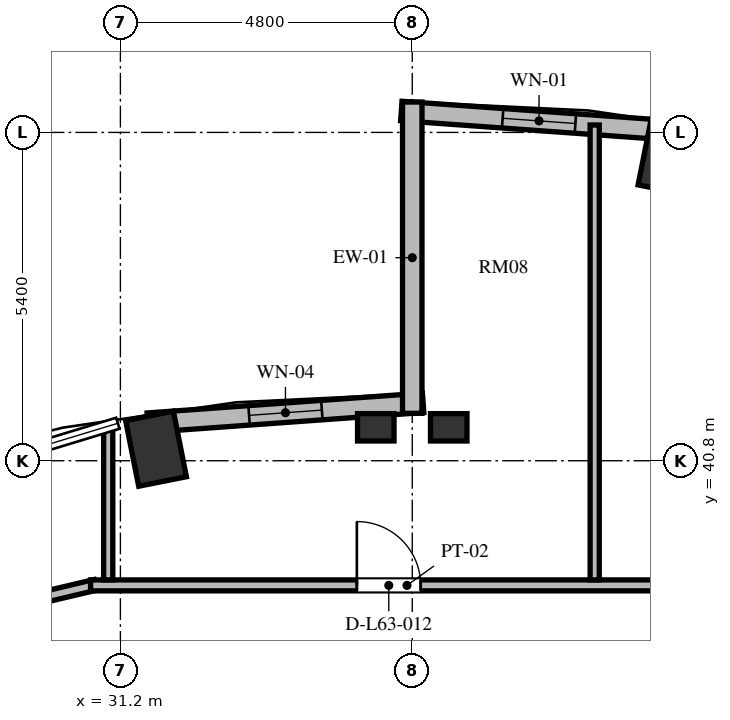
"""IFC4 building model, lengths in metres.
Left out: names, types, materials, properties, quantities, classifications, styles, units other than length and angle.
Written with IfcOpenShell. Run it as: python <this file> out.ifc"""

import sys

from ifc_helpers import new_model, si_unit, direction, frame, frame_2d, origin, origin_2d, place, context, subcontext, project, spatial, rectangle, extrude, element, fill, save


model = new_model("IFC4")
c1 = context("Model", 3, precision=1e-05, world=origin(), true_north=direction((0.0, 1.0)))
c2 = subcontext(c1, "Body", "Model", "MODEL_VIEW")
j1 = project(units=[si_unit("LENGTHUNIT", "METRE"), si_unit("PLANEANGLEUNIT", "RADIAN")], contexts=[c1])
p1 = place(None, origin())
s1 = spatial("IfcSite", under=j1, at=p1, CompositionType="ELEMENT")
p2 = place(p1, origin())
s2 = spatial("IfcBuilding", under=s1, at=p2, CompositionType="ELEMENT")
p3 = place(p2, frame((0.0, 0.0, 242.256)))
s3 = spatial("IfcBuildingStorey", under=s2, at=p3, CompositionType="ELEMENT", Elevation=242.256)
for number, where, z_axis, x_axis in (
    (1, (40.214, 45.798, 0.0), (0.0, 0.0, 1.0), (0.195, 0.981, 0.0)),
    (2, (31.786, 40.998, 0.0), (0.0, 0.0, 1.0), (-0.195, 0.981, 0.0)),
):
    element("IfcColumn", number, at=place(p3, frame(where, z_axis=z_axis, x_axis=x_axis)), inside=s3, PredefinedType="COLUMN", context=c2, shape_type="SweptSolid", body=[
        extrude(rectangle(XDim=1.1, YDim=0.8, at=origin_2d()), origin(), (0.0, 0.0, 1.0), 3.648),
    ])
for number, where, z_axis, x_axis in (
    (3, (35.4, 41.35, 0.0), (0.0, 0.0, 1.0), (1.0, 0.0, 0.0)),
    (4, (36.6, 41.35, 0.0), (0.0, 0.0, 1.0), (1.0, 0.0, 0.0)),
):
    element("IfcColumn", number, at=place(p3, frame(where, z_axis=z_axis, x_axis=x_axis)), inside=s3, PredefinedType="PILASTER", context=c2, shape_type="SweptSolid", body=[
        extrude(rectangle(XDim=0.6, YDim=0.45, at=origin_2d()), origin(), (0.0, 0.0, 1.0), 3.648),
    ])
p4 = place(p3, frame((40.35, 46.226, 0.0), z_axis=(0.0, 0.0, 1.0), x_axis=(-0.997409061056, 0.071938619141, 0.0)))
e5 = element("IfcWall", 5, at=p4, inside=s3, PredefinedType="SOLIDWALL", context=c2, shape_type="SweptSolid", body=[
    extrude(rectangle(XDim=4.541, YDim=0.32, at=frame_2d((2.271, 0.0))), origin(), (0.0, 0.0, 1.0), 3.198),
])
p5 = place(p4, frame((1.67, 0.0, 0.85)))
e6 = element("IfcOpeningElement", 6, at=p5, cuts=e5, PredefinedType="OPENING", context=c2, shape_type="SweptSolid", body=[
    extrude(rectangle(XDim=1.2, YDim=2.2, at=frame_2d((0.6, 1.1))), frame((0.0, 0.17, 0.0), z_axis=(0.0, -1.0, 0.0), x_axis=(1.0, 0.0, 0.0)), (0.0, 0.0, 1.0), 0.34),
])
p6 = place(p3, frame((36.179, 41.753, 0.0), z_axis=(0.0, 0.0, 1.0), x_axis=(-0.997408782787, -0.071942477163, 0.0)))
e7 = element("IfcWall", 7, at=p6, inside=s3, PredefinedType="SOLIDWALL", context=c2, shape_type="SweptSolid", body=[
    extrude(rectangle(XDim=4.541, YDim=0.32, at=frame_2d((2.27, 0.0))), origin(), (0.0, 0.0, 1.0), 3.198),
])
p7 = place(p6, frame((1.67, 0.0, 0.85)))
e8 = element("IfcOpeningElement", 8, at=p7, cuts=e7, PredefinedType="OPENING", context=c2, shape_type="SweptSolid", body=[
    extrude(rectangle(XDim=1.2, YDim=1.8, at=frame_2d((0.6, 0.9))), frame((0.0, 0.17, 0.0), z_axis=(0.0, -1.0, 0.0), x_axis=(1.0, 0.0, 0.0)), (0.0, 0.0, 1.0), 0.34),
])
p8 = place(p3, frame((36.0, 46.7, 0.0), z_axis=(0.0, 0.0, 1.0), x_axis=(0.0, -1.0, 0.0)))
e9 = element("IfcWall", 9, at=p8, inside=s3, PredefinedType="SOLIDWALL", context=c2, shape_type="SweptSolid", body=[
    extrude(rectangle(XDim=5.12, YDim=0.32, at=frame_2d((2.56, 0.0))), origin(), (0.0, 0.0, 1.0), 3.198),
])
p9 = place(p3, frame((28.476, 38.211, 0.0), z_axis=(0.0, 0.0, 1.0), x_axis=(0.973030562203, 0.230676234189, 0.0)))
e10 = element("IfcWall", 10, at=p9, inside=s3, PredefinedType="PARTITIONING", context=c2, shape_type="SweptSolid", body=[
    extrude(rectangle(XDim=2.377, YDim=0.18, at=frame_2d((1.188, 0.0))), origin(), (0.0, 0.0, 1.0), 3.198),
])
p10 = place(p3, frame((30.71, 38.75, 0.0), z_axis=(0.0, 0.0, 1.0), x_axis=(1.0, 0.0, 0.0)))
e11 = element("IfcWall", 11, at=p10, inside=s3, PredefinedType="PARTITIONING", context=c2, shape_type="SweptSolid", body=[
    extrude(rectangle(XDim=20.815, YDim=0.18, at=frame_2d((10.408, 0.0))), origin(), (0.0, 0.0, 1.0), 2.823),
])
p11 = place(p10, frame((11.515, 0.0, 0.0)))
e12 = element("IfcOpeningElement", 12, at=p11, cuts=e11, PredefinedType="OPENING", context=c2, shape_type="SweptSolid", body=[
    extrude(rectangle(XDim=1.05, YDim=2.15, at=frame_2d((0.525, 1.075))), frame((0.0, 0.1, 0.0), z_axis=(0.0, -1.0, 0.0), x_axis=(1.0, 0.0, 0.0)), (0.0, 0.0, 1.0), 0.2),
])
p12 = place(p10, frame((4.379, 0.0, 0.0)))
e13 = element("IfcOpeningElement", 13, at=p12, cuts=e11, PredefinedType="OPENING", context=c2, shape_type="SweptSolid", body=[
    extrude(rectangle(XDim=1.05, YDim=2.15, at=frame_2d((0.525, 1.075))), frame((0.0, 0.1, 0.0), z_axis=(0.0, -1.0, 0.0), x_axis=(1.0, 0.0, 0.0)), (0.0, 0.0, 1.0), 0.2),
])
p13 = place(p3, frame((31.0, 38.84, 0.0), z_axis=(0.0, 0.0, 1.0), x_axis=(0.0, 1.0, 0.0)))
e14 = element("IfcWall", 14, at=p13, inside=s3, PredefinedType="PARTITIONING", context=c2, shape_type="SweptSolid", body=[
    extrude(rectangle(XDim=2.511, YDim=0.15, at=frame_2d((1.256, 0.0))), origin(), (0.0, 0.0, 1.0), 3.198),
])
p14 = place(p3, frame((39.0, 38.84, 0.0), z_axis=(0.0, 0.0, 1.0), x_axis=(0.0, 1.0, 0.0)))
e15 = element("IfcWall", 15, at=p14, inside=s3, PredefinedType="PARTITIONING", context=c2, shape_type="SweptSolid", body=[
    extrude(rectangle(XDim=7.482, YDim=0.15, at=frame_2d((3.741, 0.0))), origin(), (0.0, 0.0, 1.0), 3.198),
])
p15 = place(p5, origin())
e16 = element("IfcWindow", 16, at=p15, inside=s3, PartitioningType="SINGLE_PANEL", PredefinedType="WINDOW", context=c2, shape_type="SweptSolid", body=[
    extrude(rectangle(XDim=1.2, YDim=2.2, at=frame_2d((0.6, 1.1))), frame((0.0, 0.03, 0.0), z_axis=(0.0, -1.0, 0.0), x_axis=(1.0, 0.0, 0.0)), (0.0, 0.0, 1.0), 0.06),
])
fill(e6, e16)
p16 = place(p7, origin())
e17 = element("IfcWindow", 17, at=p16, inside=s3, PartitioningType="SINGLE_PANEL", PredefinedType="WINDOW", context=c2, shape_type="SweptSolid", body=[
    extrude(rectangle(XDim=1.2, YDim=1.8, at=frame_2d((0.6, 0.9))), frame((0.0, 0.03, 0.0), z_axis=(0.0, -1.0, 0.0), x_axis=(1.0, 0.0, 0.0)), (0.0, 0.0, 1.0), 0.06),
])
fill(e8, e17)
p17 = place(p12, origin())
e18 = element("IfcDoor", 18, at=p17, inside=s3, OperationType="SINGLE_SWING_LEFT", PredefinedType="DOOR", context=c2, shape_type="SweptSolid", body=[
    extrude(rectangle(XDim=1.05, YDim=2.15, at=frame_2d((0.525, 1.075))), frame((0.0, 0.025, 0.0), z_axis=(0.0, -1.0, 0.0), x_axis=(1.0, 0.0, 0.0)), (0.0, 0.0, 1.0), 0.05),
])
fill(e13, e18)
save(model, sys.argv[1])
